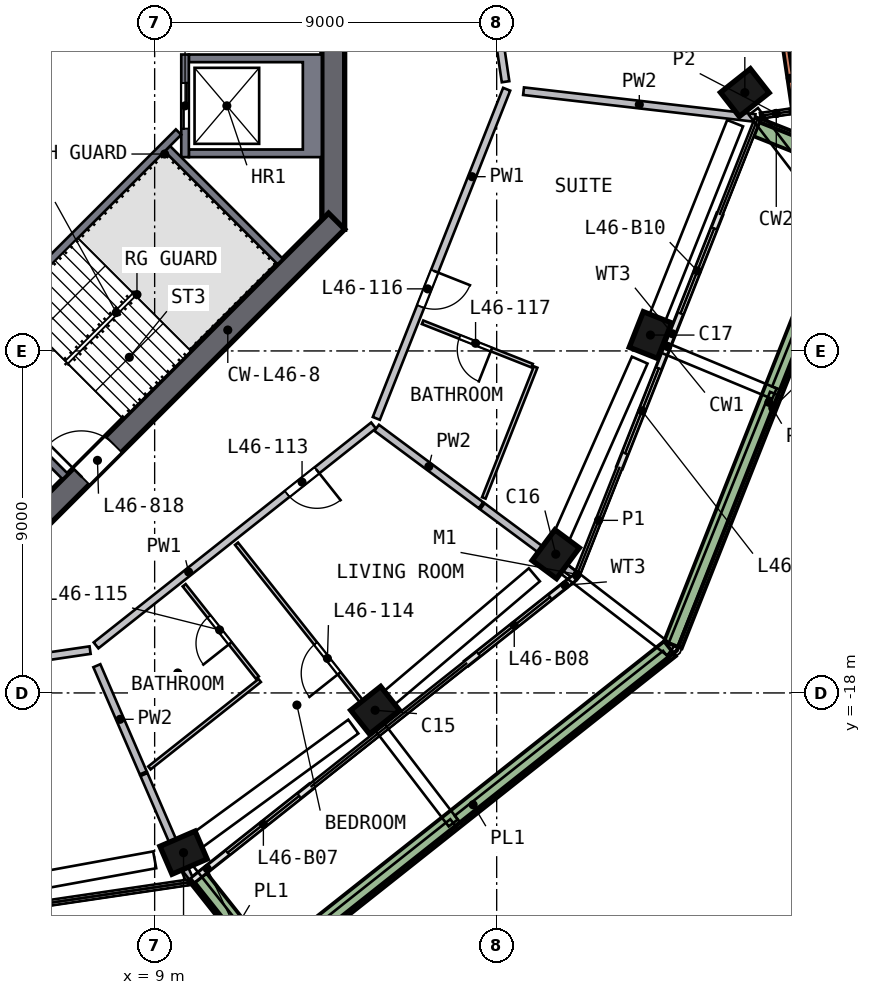
"""IFC4 building model, lengths in metres.
Left out: names, types, materials, properties, quantities, classifications, styles, units other than length and angle.
Written with IfcOpenShell. Run it as: python <this file> out.ifc"""

import sys

from ifc_helpers import new_model, si_unit, direction, frame, frame_2d, origin, origin_2d, place, context, subcontext, project, spatial, polyline, rectangle, outline, extrude, element, fill, save


model = new_model("IFC4")
c1 = context("Model", 3, precision=1e-05, world=origin(), true_north=direction((0.0, 1.0)))
c2 = subcontext(c1, "Body", "Model", "MODEL_VIEW")
j1 = project(units=[si_unit("LENGTHUNIT", "METRE"), si_unit("PLANEANGLEUNIT", "RADIAN")], contexts=[c1])
p1 = place(None, origin())
s1 = spatial("IfcSite", under=j1, at=p1, CompositionType="ELEMENT")
p2 = place(p1, origin())
s2 = spatial("IfcBuilding", under=s1, at=p2, CompositionType="ELEMENT")
p3 = place(p2, frame((0.0, 0.0, 190.5)))
s3 = spatial("IfcBuildingStorey", under=s2, at=p3, CompositionType="ELEMENT", Elevation=190.5)
p4 = place(p3, frame((9.633, -22.26, 0.0), z_axis=(0.105445221, 0.046678706, 0.99332895), x_axis=(-0.911690041, -0.394366098, 0.115311103)))
e1 = element("IfcColumn", 1, at=p4, inside=s3, PredefinedType="COLUMN", context=c2, shape_type="SweptSolid", body=[
    extrude(rectangle(XDim=1.0, YDim=0.8, at=origin_2d()), origin(), (0.0, 0.0, 1.0), 3.211),
])
p5 = place(p3, frame((14.695, -18.541, 0.0), z_axis=(0.087607602, 0.070648839, 0.993646642), x_axis=(0.778743429, 0.617165473, -0.112540881)))
e2 = element("IfcColumn", 2, at=p5, inside=s3, PredefinedType="COLUMN", context=c2, shape_type="SweptSolid", body=[
    extrude(rectangle(XDim=1.0, YDim=0.8, at=origin_2d()), origin(), (0.0, 0.0, 1.0), 3.21),
])
p6 = place(p3, frame((19.472, -14.461, 0.0), z_axis=(0.06796559, 0.093129584, 0.993331545), x_axis=(-0.592364206, -0.797378926, 0.115288748)))
e3 = element("IfcColumn", 3, at=p6, inside=s3, PredefinedType="COLUMN", context=c2, shape_type="SweptSolid", body=[
    extrude(rectangle(XDim=1.0, YDim=0.8, at=origin_2d()), origin(), (0.0, 0.0, 1.0), 3.211),
])
p7 = place(p3, frame((21.997, -8.709, 0.0), z_axis=(0.04053392, 0.104947109, 0.9936514), x_axis=(0.365857575, 0.923846438, -0.112498865)))
e4 = element("IfcColumn", 4, at=p7, inside=s3, PredefinedType="COLUMN", context=c2, shape_type="SweptSolid", body=[
    extrude(rectangle(XDim=1.0, YDim=0.8, at=origin_2d()), origin(), (0.0, 0.0, 1.0), 3.21),
])
p8 = place(p3, frame((24.517, -2.344, 0.0), z_axis=(0.010109138, 0.116597131, 0.993127844), x_axis=(-0.785151985, -0.614102533, 0.080090196)))
e5 = element("IfcColumn", 5, at=p8, inside=s3, PredefinedType="COLUMN", context=c2, shape_type="SweptSolid", body=[
    extrude(rectangle(XDim=1.0, YDim=0.8, at=origin_2d()), origin(), (0.0, 0.0, 1.0), 3.212),
])
p9 = place(p3, frame((13.7, -5.799, 0.0), z_axis=(0.0, 0.0, 1.0), x_axis=(0.0, 1.0, 0.0)))
e6 = element("IfcWall", 6, at=p9, inside=s3, PredefinedType="SHEAR", context=c2, shape_type="SweptSolid", body=[
    extrude(rectangle(XDim=11.598, YDim=0.6, at=frame_2d((5.799, 0.0))), origin(), (0.0, 0.0, 1.0), 3.5),
])
p10 = place(p9, frame((4.899, 0.0, 0.0)))
e7 = element("IfcOpeningElement", 7, at=p10, cuts=e6, PredefinedType="OPENING", context=c2, shape_type="SweptSolid", body=[
    extrude(rectangle(XDim=1.8, YDim=2.1, at=frame_2d((0.9, 1.05))), frame((0.0, 0.31, 0.0), z_axis=(0.0, -1.0, 0.0), x_axis=(1.0, 0.0, 0.0)), (0.0, 0.0, 1.0), 0.62),
])
p11 = place(p3, frame((5.587, -13.788, 0.0), z_axis=(0.0, 0.0, 1.0), x_axis=(0.707106781, 0.707106781, 0.0)))
e8 = element("IfcWall", 8, at=p11, inside=s3, PredefinedType="SHEAR", context=c2, shape_type="SweptSolid", body=[
    extrude(rectangle(XDim=11.598, YDim=0.6, at=frame_2d((5.799, 0.0))), origin(), (0.0, 0.0, 1.0), 3.5),
])
p12 = place(p11, frame((2.099, 0.0, 0.0)))
e9 = element("IfcOpeningElement", 9, at=p12, cuts=e8, PredefinedType="OPENING", context=c2, shape_type="SweptSolid", body=[
    extrude(rectangle(XDim=1.2, YDim=2.1, at=frame_2d((0.6, 1.05))), frame((0.0, 0.31, 0.0), z_axis=(0.0, -1.0, 0.0), x_axis=(1.0, 0.0, 0.0)), (0.0, 0.0, 1.0), 0.62),
])
p13 = place(p3, frame((25.863, -2.751, 0.0), z_axis=(0.0, 0.0, 1.0), x_axis=(-0.146086211, 0.989271863, 0.0)))
e10 = element("IfcWall", 10, at=p13, inside=s3, PredefinedType="SOLIDWALL", context=c2, shape_type="SweptSolid", body=[
    extrude(rectangle(XDim=1.875, YDim=0.15, at=frame_2d((0.938, 0.0))), origin(), (0.0, 0.0, 1.0), 3.19),
])
p14 = place(p3, frame((10.006, -22.927, 0.0), z_axis=(0.0, 0.0, 1.0), x_axis=(0.783712528, 0.621123718, 0.0)))
e11 = element("IfcWall", 11, at=p14, inside=s3, PredefinedType="SOLIDWALL", context=c2, shape_type="SweptSolid", body=[
    extrude(rectangle(XDim=3.967, YDim=0.15, at=frame_2d((1.984, 0.0))), origin(), (0.0, 0.0, 1.0), 2.475),
])
p15 = place(p14, frame((1.167, 0.0, 0.0)))
e12 = element("IfcOpeningElement", 12, at=p15, cuts=e11, PredefinedType="OPENING", context=c2, shape_type="SweptSolid", body=[
    extrude(rectangle(XDim=2.4, YDim=2.4, at=frame_2d((1.2, 1.2))), frame((0.0, 0.085, 0.0), z_axis=(0.0, -1.0, 0.0), x_axis=(1.0, 0.0, 0.0)), (0.0, 0.0, 1.0), 0.17),
])
p16 = place(p3, frame((17.209, -17.219, 0.0), z_axis=(0.0, 0.0, 1.0), x_axis=(0.783705487, 0.621132603, 0.0)))
e13 = element("IfcWall", 13, at=p16, inside=s3, PredefinedType="SOLIDWALL", context=c2, shape_type="SweptSolid", body=[
    extrude(rectangle(XDim=3.609, YDim=0.15, at=frame_2d((1.804, 0.0))), origin(), (0.0, 0.0, 1.0), 2.475),
])
p17 = place(p16, frame((0.4, 0.0, 0.0)))
e14 = element("IfcOpeningElement", 14, at=p17, cuts=e13, PredefinedType="OPENING", context=c2, shape_type="SweptSolid", body=[
    extrude(rectangle(XDim=2.4, YDim=2.4, at=frame_2d((1.2, 1.2))), frame((0.0, 0.085, 0.0), z_axis=(0.0, -1.0, 0.0), x_axis=(1.0, 0.0, 0.0)), (0.0, 0.0, 1.0), 0.17),
])
p18 = place(p3, frame((21.233, -12.064, 0.0), z_axis=(0.0, 0.0, 1.0), x_axis=(0.368157089, 0.929763603, 0.0)))
e15 = element("IfcWall", 15, at=p18, inside=s3, PredefinedType="SOLIDWALL", context=c2, shape_type="SweptSolid", body=[
    extrude(rectangle(XDim=3.4, YDim=0.15, at=frame_2d((1.7, 0.0))), origin(), (0.0, 0.0, 1.0), 2.475),
])
p19 = place(p18, frame((0.4, 0.0, 0.0)))
e16 = element("IfcOpeningElement", 16, at=p19, cuts=e15, PredefinedType="OPENING", context=c2, shape_type="SweptSolid", body=[
    extrude(rectangle(XDim=2.4, YDim=2.4, at=frame_2d((1.2, 1.2))), frame((0.0, 0.085, 0.0), z_axis=(0.0, -1.0, 0.0), x_axis=(1.0, 0.0, 0.0)), (0.0, 0.0, 1.0), 0.17),
])
p20 = place(p3, frame((22.485, -8.903, 0.0), z_axis=(0.0, 0.0, 1.0), x_axis=(0.36808703, 0.929791341, 0.0)))
e17 = element("IfcWall", 17, at=p20, inside=s3, PredefinedType="SOLIDWALL", context=c2, shape_type="SweptSolid", body=[
    extrude(rectangle(XDim=3.761, YDim=0.15, at=frame_2d((1.881, 0.0))), origin(), (0.0, 0.0, 1.0), 2.475),
])
p21 = place(p20, frame((0.961, 0.0, 0.0)))
e18 = element("IfcOpeningElement", 18, at=p21, cuts=e17, PredefinedType="OPENING", context=c2, shape_type="SweptSolid", body=[
    extrude(rectangle(XDim=2.4, YDim=2.4, at=frame_2d((1.2, 1.2))), frame((0.0, 0.085, 0.0), z_axis=(0.0, -1.0, 0.0), x_axis=(1.0, 0.0, 0.0)), (0.0, 0.0, 1.0), 0.17),
])
p22 = place(p3, frame((10.171, -22.894, 0.0), z_axis=(0.0, 0.0, 1.0), x_axis=(0.621142666, -0.783697511, 0.0)))
e19 = element("IfcWall", 19, at=p22, inside=s3, PredefinedType="SOLIDWALL", context=c2, shape_type="SweptSolid", body=[
    extrude(rectangle(XDim=3.199, YDim=0.5, at=frame_2d((1.6, 0.0))), origin(), (0.0, 0.0, 1.0), 0.7),
])
p23 = place(p3, frame((12.198, -25.05, 0.0), z_axis=(0.0, 0.0, 1.0), x_axis=(0.783694155, 0.6211469, 0.0)))
e20 = element("IfcWall", 20, at=p23, inside=s3, PredefinedType="SOLIDWALL", context=c2, shape_type="SweptSolid", body=[
    extrude(rectangle(XDim=13.223, YDim=0.5, at=frame_2d((6.612, 0.0))), origin(), (0.0, 0.0, 1.0), 0.7),
])
p24 = place(p3, frame((22.638, -16.732, 0.0), z_axis=(0.0, 0.0, 1.0), x_axis=(0.368127914, 0.929775155, 0.0)))
e21 = element("IfcWall", 21, at=p24, inside=s3, PredefinedType="SOLIDWALL", context=c2, shape_type="SweptSolid", body=[
    extrude(rectangle(XDim=13.723, YDim=0.5, at=frame_2d((6.862, 0.0))), origin(), (0.0, 0.0, 1.0), 0.7),
])
p25 = place(p3, frame((27.366, -4.113, 0.0), z_axis=(0.0, 0.0, 1.0), x_axis=(-0.92976856, 0.36814457, 0.0)))
e22 = element("IfcWall", 22, at=p25, inside=s3, PredefinedType="SOLIDWALL", context=c2, shape_type="SweptSolid", body=[
    extrude(rectangle(XDim=2.699, YDim=0.5, at=frame_2d((1.35, 0.0))), origin(), (0.0, 0.0, 1.0), 0.7),
])
p26 = place(p3, origin())
e23 = element("IfcWall", 23, at=p26, inside=s3, PredefinedType="SOLIDWALL", context=c2, shape_type="SweptSolid", body=[
    extrude(outline(polyline([(13.4, -3.9), (9.9, -3.9), (9.9, -3.7), (12.9, -3.7), (12.9, -1.4), (9.9, -1.4), (9.9, -1.2), (13.4, -1.2), (13.4, -3.9)])), origin(), (0.0, 0.0, 1.0), 3.19),
])
p27 = place(p3, frame((9.8, -1.2, 0.0), z_axis=(0.0, 0.0, 1.0), x_axis=(0.0, -1.0, 0.0)))
e24 = element("IfcWall", 24, at=p27, inside=s3, PredefinedType="SOLIDWALL", context=c2, shape_type="SweptSolid", body=[
    extrude(rectangle(XDim=2.7, YDim=0.2, at=frame_2d((1.35, 0.0))), origin(), (0.0, 0.0, 1.0), 3.19),
])
p28 = place(p27, frame((0.75, 0.0, 0.0)))
e25 = element("IfcOpeningElement", 25, at=p28, cuts=e24, PredefinedType="OPENING", context=c2, shape_type="SweptSolid", body=[
    extrude(rectangle(XDim=1.2, YDim=2.1, at=frame_2d((0.6, 1.05))), frame((0.0, 0.11, 0.0), z_axis=(0.0, -1.0, 0.0), x_axis=(1.0, 0.0, 0.0)), (0.0, 0.0, 1.0), 0.22),
])
p29 = place(p3, frame((9.629, -3.24, 0.0), z_axis=(0.0, 0.0, 1.0), x_axis=(-0.707120946, -0.707092617, 0.0)))
e26 = element("IfcWall", 26, at=p29, inside=s3, PredefinedType="SOLIDWALL", context=c2, shape_type="SweptSolid", body=[
    extrude(rectangle(XDim=8.618, YDim=0.2, at=frame_2d((4.309, 0.0))), origin(), (0.0, 0.0, 1.0), 3.19),
])
p30 = place(p29, frame((7.018, 0.0, 0.0)))
e27 = element("IfcOpeningElement", 27, at=p30, cuts=e26, PredefinedType="OPENING", context=c2, shape_type="SweptSolid", body=[
    extrude(rectangle(XDim=1.2, YDim=2.1, at=frame_2d((0.6, 1.05))), frame((0.0, 0.11, 0.0), z_axis=(0.0, -1.0, 0.0), x_axis=(1.0, 0.0, 0.0)), (0.0, 0.0, 1.0), 0.22),
])
for number, where, z_axis, x_axis in (
    (28, (3.677, -9.334, 0.0), (0.0, 0.0, 1.0), (0.707, -0.707, 0.0)),
    (29, (9.334, -3.677, 0.0), (0.0, 0.0, 1.0), (0.707, -0.707, 0.0)),
):
    element("IfcWall", number, at=place(p3, frame(where, z_axis=z_axis, x_axis=x_axis)), inside=s3, PredefinedType="SOLIDWALL", context=c2, shape_type="SweptSolid", body=[
        extrude(rectangle(XDim=4.2, YDim=0.2, at=frame_2d((2.1, 0.0))), origin(), (0.0, 0.0, 1.0), 3.19),
    ])
p31 = place(p3, frame((7.302, -16.873, 0.0), z_axis=(0.0, 0.0, 1.0), x_axis=(-0.989275099, -0.146064299, 0.0)))
e30 = element("IfcWall", 30, at=p31, inside=s3, PredefinedType="SOLIDWALL", context=c2, shape_type="SweptSolid", body=[
    extrude(rectangle(XDim=9.317, YDim=0.2, at=frame_2d((4.658, 0.0))), origin(), (0.0, 0.0, 1.0), 3.19),
])
p32 = place(p31, frame((5.15, 0.0, 0.0)))
e31 = element("IfcOpeningElement", 31, at=p32, cuts=e30, PredefinedType="OPENING", context=c2, shape_type="SweptSolid", body=[
    extrude(rectangle(XDim=1.0, YDim=2.1, at=frame_2d((0.5, 1.05))), frame((0.0, 0.11, 0.0), z_axis=(0.0, -1.0, 0.0), x_axis=(1.0, 0.0, 0.0)), (0.0, 0.0, 1.0), 0.22),
])
p33 = place(p3, frame((14.76, -10.961, 0.0), z_axis=(0.0, 0.0, 1.0), x_axis=(-0.783683297, -0.621160599, 0.0)))
e32 = element("IfcWall", 32, at=p33, inside=s3, PredefinedType="SOLIDWALL", context=c2, shape_type="SweptSolid", body=[
    extrude(rectangle(XDim=9.317, YDim=0.2, at=frame_2d((4.658, 0.0))), origin(), (0.0, 0.0, 1.0), 3.19),
])
p34 = place(p33, frame((1.9, 0.0, 0.0)))
e33 = element("IfcOpeningElement", 33, at=p34, cuts=e32, PredefinedType="OPENING", context=c2, shape_type="SweptSolid", body=[
    extrude(rectangle(XDim=1.0, YDim=2.1, at=frame_2d((0.5, 1.05))), frame((0.0, 0.11, 0.0), z_axis=(0.0, -1.0, 0.0), x_axis=(1.0, 0.0, 0.0)), (0.0, 0.0, 1.0), 0.22),
])
p35 = place(p3, frame((18.263, -2.113, 0.0), z_axis=(0.0, 0.0, 1.0), x_axis=(-0.368126327, -0.929775783, 0.0)))
e34 = element("IfcWall", 34, at=p35, inside=s3, PredefinedType="SOLIDWALL", context=c2, shape_type="SweptSolid", body=[
    extrude(rectangle(XDim=9.317, YDim=0.2, at=frame_2d((4.658, 0.0))), origin(), (0.0, 0.0, 1.0), 3.19),
])
p36 = place(p35, frame((5.15, 0.0, 0.0)))
e35 = element("IfcOpeningElement", 35, at=p36, cuts=e34, PredefinedType="OPENING", context=c2, shape_type="SweptSolid", body=[
    extrude(rectangle(XDim=1.0, YDim=2.1, at=frame_2d((0.5, 1.05))), frame((0.0, 0.11, 0.0), z_axis=(0.0, -1.0, 0.0), x_axis=(1.0, 0.0, 0.0)), (0.0, 0.0, 1.0), 0.22),
])
p37 = place(p3, frame((16.873, 7.302, 0.0), z_axis=(0.0, 0.0, 1.0), x_axis=(0.146064299, -0.989275099, 0.0)))
e36 = element("IfcWall", 36, at=p37, inside=s3, PredefinedType="SOLIDWALL", context=c2, shape_type="SweptSolid", body=[
    extrude(rectangle(XDim=9.317, YDim=0.2, at=frame_2d((4.658, 0.0))), origin(), (0.0, 0.0, 1.0), 3.19),
])
p38 = place(p37, frame((3.869, 0.0, 0.0)))
e37 = element("IfcOpeningElement", 37, at=p38, cuts=e36, PredefinedType="OPENING", context=c2, shape_type="SweptSolid", body=[
    extrude(rectangle(XDim=1.8, YDim=2.1, at=frame_2d((0.9, 1.05))), frame((0.0, 0.11, 0.0), z_axis=(0.0, -1.0, 0.0), x_axis=(1.0, 0.0, 0.0)), (0.0, 0.0, 1.0), 0.22),
])
p39 = place(p3, frame((7.479, -17.283, 0.0), z_axis=(0.0, 0.0, 1.0), x_axis=(0.397175095, -0.917742853, 0.0)))
e38 = element("IfcWall", 38, at=p39, inside=s3, PredefinedType="SOLIDWALL", context=c2, shape_type="SweptSolid", body=[
    extrude(rectangle(XDim=3.075, YDim=0.2, at=frame_2d((1.537, 0.0))), origin(), (0.0, 0.0, 1.0), 3.19),
])
p40 = place(p3, frame((8.719, -20.147, 0.0), z_axis=(0.0, 0.0, 1.0), x_axis=(0.39710682, -0.917772397, 0.0)))
e39 = element("IfcWall", 39, at=p40, inside=s3, PredefinedType="SOLIDWALL", context=c2, shape_type="SweptSolid", body=[
    extrude(rectangle(XDim=3.011, YDim=0.2, at=frame_2d((1.506, 0.0))), origin(), (0.0, 0.0, 1.0), 3.19),
])
p41 = place(p3, frame((14.843, -11.023, 0.0), z_axis=(0.0, 0.0, 1.0), x_axis=(0.802827845, -0.596210911, 0.0)))
e40 = element("IfcWall", 40, at=p41, inside=s3, PredefinedType="SOLIDWALL", context=c2, shape_type="SweptSolid", body=[
    extrude(rectangle(XDim=3.418, YDim=0.2, at=frame_2d((1.709, 0.0))), origin(), (0.0, 0.0, 1.0), 3.19),
])
p42 = place(p3, frame((17.624, -13.089, 0.0), z_axis=(0.0, 0.0, 1.0), x_axis=(0.802773785, -0.596283699, 0.0)))
e41 = element("IfcWall", 41, at=p42, inside=s3, PredefinedType="SOLIDWALL", context=c2, shape_type="SweptSolid", body=[
    extrude(rectangle(XDim=3.011, YDim=0.2, at=frame_2d((1.506, 0.0))), origin(), (0.0, 0.0, 1.0), 3.19),
])
p43 = place(p3, frame((24.799, -2.869, 0.0), z_axis=(0.0, 0.0, 1.0), x_axis=(-0.993371918, 0.114944478, 0.0)))
e42 = element("IfcWall", 42, at=p43, inside=s3, PredefinedType="SOLIDWALL", context=c2, shape_type="SweptSolid", body=[
    extrude(rectangle(XDim=6.132, YDim=0.2, at=frame_2d((3.066, 0.0))), origin(), (0.0, 0.0, 1.0), 3.19),
])
p44 = place(p3, frame((8.862, -19.975, 0.0), z_axis=(0.0, 0.0, 1.0), x_axis=(0.783664748, 0.621184001, 0.0)))
e43 = element("IfcWall", 43, at=p44, inside=s3, PredefinedType="PARTITIONING", context=c2, shape_type="SweptSolid", body=[
    extrude(rectangle(XDim=3.704, YDim=0.1, at=frame_2d((1.852, 0.0))), origin(), (0.0, 0.0, 1.0), 3.19),
])
p45 = place(p3, frame((11.702, -17.595, 0.0), z_axis=(0.0, 0.0, 1.0), x_axis=(-0.621144616, 0.783695965, 0.0)))
e44 = element("IfcWall", 44, at=p45, inside=s3, PredefinedType="PARTITIONING", context=c2, shape_type="SweptSolid", body=[
    extrude(rectangle(XDim=3.1, YDim=0.1, at=frame_2d((1.55, 0.0))), origin(), (0.0, 0.0, 1.0), 3.19),
])
p46 = place(p45, frame((1.15, 0.0, 0.0)))
e45 = element("IfcOpeningElement", 45, at=p46, cuts=e44, PredefinedType="OPENING", context=c2, shape_type="SweptSolid", body=[
    extrude(rectangle(XDim=0.9, YDim=2.1, at=frame_2d((0.45, 1.05))), frame((0.0, 0.06, 0.0), z_axis=(0.0, -1.0, 0.0), x_axis=(1.0, 0.0, 0.0)), (0.0, 0.0, 1.0), 0.12),
])
p47 = place(p3, frame((14.975, -18.894, 0.0), z_axis=(0.0, 0.0, 1.0), x_axis=(-0.621140066, 0.783699571, 0.0)))
e46 = element("IfcWall", 46, at=p47, inside=s3, PredefinedType="PARTITIONING", context=c2, shape_type="SweptSolid", body=[
    extrude(rectangle(XDim=6.15, YDim=0.1, at=frame_2d((3.075, 0.0))), origin(), (0.0, 0.0, 1.0), 3.19),
])
p48 = place(p47, frame((1.8, 0.0, 0.0)))
e47 = element("IfcOpeningElement", 47, at=p48, cuts=e46, PredefinedType="OPENING", context=c2, shape_type="SweptSolid", body=[
    extrude(rectangle(XDim=1.0, YDim=2.1, at=frame_2d((0.5, 1.05))), frame((0.0, 0.06, 0.0), z_axis=(0.0, -1.0, 0.0), x_axis=(1.0, 0.0, 0.0)), (0.0, 0.0, 1.0), 0.12),
])
p49 = place(p3, frame((18.932, -9.387, 0.0), z_axis=(0.0, 0.0, 1.0), x_axis=(-0.929795945, 0.3680754, 0.0)))
e48 = element("IfcWall", 48, at=p49, inside=s3, PredefinedType="PARTITIONING", context=c2, shape_type="SweptSolid", body=[
    extrude(rectangle(XDim=3.1, YDim=0.1, at=frame_2d((1.55, 0.0))), origin(), (0.0, 0.0, 1.0), 3.19),
])
p50 = place(p49, frame((1.15, 0.0, 0.0)))
e49 = element("IfcOpeningElement", 49, at=p50, cuts=e48, PredefinedType="OPENING", context=c2, shape_type="SweptSolid", body=[
    extrude(rectangle(XDim=0.9, YDim=2.1, at=frame_2d((0.45, 1.05))), frame((0.0, 0.06, 0.0), z_axis=(0.0, -1.0, 0.0), x_axis=(1.0, 0.0, 0.0)), (0.0, 0.0, 1.0), 0.12),
])
p51 = place(p3, frame((19.025, -9.424, 0.0), z_axis=(0.0, 0.0, 1.0), x_axis=(-0.368126804, -0.929775595, 0.0)))
e50 = element("IfcWall", 50, at=p51, inside=s3, PredefinedType="PARTITIONING", context=c2, shape_type="SweptSolid", body=[
    extrude(rectangle(XDim=3.704, YDim=0.1, at=frame_2d((1.852, 0.0))), origin(), (0.0, 0.0, 1.0), 3.19),
])
p52 = place(p15, origin())
e51 = element("IfcDoor", 51, at=p52, inside=s3, OperationType="SLIDING_TO_LEFT", PredefinedType="DOOR", context=c2, shape_type="SweptSolid", body=[
    extrude(rectangle(XDim=2.4, YDim=2.4, at=frame_2d((1.2, 1.2))), frame((0.0, 0.025, 0.0), z_axis=(0.0, -1.0, 0.0), x_axis=(1.0, 0.0, 0.0)), (0.0, 0.0, 1.0), 0.05),
])
fill(e12, e51)
p53 = place(p17, origin())
e52 = element("IfcDoor", 52, at=p53, inside=s3, OperationType="SLIDING_TO_RIGHT", PredefinedType="DOOR", context=c2, shape_type="SweptSolid", body=[
    extrude(rectangle(XDim=2.4, YDim=2.4, at=frame_2d((1.2, 1.2))), frame((0.0, 0.025, 0.0), z_axis=(0.0, -1.0, 0.0), x_axis=(1.0, 0.0, 0.0)), (0.0, 0.0, 1.0), 0.05),
])
fill(e14, e52)
p54 = place(p19, origin())
e53 = element("IfcDoor", 53, at=p54, inside=s3, OperationType="SLIDING_TO_RIGHT", PredefinedType="DOOR", context=c2, shape_type="SweptSolid", body=[
    extrude(rectangle(XDim=2.4, YDim=2.4, at=frame_2d((1.2, 1.2))), frame((0.0, 0.025, 0.0), z_axis=(0.0, -1.0, 0.0), x_axis=(1.0, 0.0, 0.0)), (0.0, 0.0, 1.0), 0.05),
])
fill(e16, e53)
p55 = place(p21, origin())
e54 = element("IfcDoor", 54, at=p55, inside=s3, OperationType="SLIDING_TO_LEFT", PredefinedType="DOOR", context=c2, shape_type="SweptSolid", body=[
    extrude(rectangle(XDim=2.4, YDim=2.4, at=frame_2d((1.2, 1.2))), frame((0.0, 0.025, 0.0), z_axis=(0.0, -1.0, 0.0), x_axis=(1.0, 0.0, 0.0)), (0.0, 0.0, 1.0), 0.05),
])
fill(e18, e54)
p56 = place(p28, origin())
e55 = element("IfcDoor", 55, at=p56, inside=s3, OperationType="DOUBLE_DOOR_SLIDING", PredefinedType="DOOR", context=c2, shape_type="SweptSolid", body=[
    extrude(rectangle(XDim=1.2, YDim=2.1, at=frame_2d((0.6, 1.05))), frame((0.0, 0.025, 0.0), z_axis=(0.0, -1.0, 0.0), x_axis=(1.0, 0.0, 0.0)), (0.0, 0.0, 1.0), 0.05),
])
fill(e25, e55)
p57 = place(p12, origin())
e56 = element("IfcDoor", 56, at=p57, inside=s3, OperationType="SINGLE_SWING_LEFT", PredefinedType="DOOR", context=c2, shape_type="SweptSolid", body=[
    extrude(rectangle(XDim=1.2, YDim=2.1, at=frame_2d((0.6, 1.05))), frame((0.0, 0.025, 0.0), z_axis=(0.0, -1.0, 0.0), x_axis=(1.0, 0.0, 0.0)), (0.0, 0.0, 1.0), 0.05),
])
fill(e9, e56)
p58 = place(p34, origin())
e57 = element("IfcDoor", 57, at=p58, inside=s3, OperationType="SINGLE_SWING_LEFT", PredefinedType="DOOR", context=c2, shape_type="SweptSolid", body=[
    extrude(rectangle(XDim=1.0, YDim=2.1, at=frame_2d((0.5, 1.05))), frame((0.0, 0.025, 0.0), z_axis=(0.0, -1.0, 0.0), x_axis=(1.0, 0.0, 0.0)), (0.0, 0.0, 1.0), 0.05),
])
fill(e33, e57)
p59 = place(p48, origin())
e58 = element("IfcDoor", 58, at=p59, inside=s3, OperationType="SINGLE_SWING_LEFT", PredefinedType="DOOR", context=c2, shape_type="SweptSolid", body=[
    extrude(rectangle(XDim=1.0, YDim=2.1, at=frame_2d((0.5, 1.05))), frame((0.0, 0.025, 0.0), z_axis=(0.0, -1.0, 0.0), x_axis=(1.0, 0.0, 0.0)), (0.0, 0.0, 1.0), 0.05),
])
fill(e47, e58)
p60 = place(p46, origin())
e59 = element("IfcDoor", 59, at=p60, inside=s3, OperationType="SINGLE_SWING_LEFT", PredefinedType="DOOR", context=c2, shape_type="SweptSolid", body=[
    extrude(rectangle(XDim=0.9, YDim=2.1, at=frame_2d((0.45, 1.05))), frame((0.0, 0.025, 0.0), z_axis=(0.0, -1.0, 0.0), x_axis=(1.0, 0.0, 0.0)), (0.0, 0.0, 1.0), 0.05),
])
fill(e45, e59)
p61 = place(p36, origin())
e60 = element("IfcDoor", 60, at=p61, inside=s3, OperationType="SINGLE_SWING_LEFT", PredefinedType="DOOR", context=c2, shape_type="SweptSolid", body=[
    extrude(rectangle(XDim=1.0, YDim=2.1, at=frame_2d((0.5, 1.05))), frame((0.0, 0.025, 0.0), z_axis=(0.0, -1.0, 0.0), x_axis=(1.0, 0.0, 0.0)), (0.0, 0.0, 1.0), 0.05),
])
fill(e35, e60)
p62 = place(p50, origin())
e61 = element("IfcDoor", 61, at=p62, inside=s3, OperationType="SINGLE_SWING_LEFT", PredefinedType="DOOR", context=c2, shape_type="SweptSolid", body=[
    extrude(rectangle(XDim=0.9, YDim=2.1, at=frame_2d((0.45, 1.05))), frame((0.0, 0.025, 0.0), z_axis=(0.0, -1.0, 0.0), x_axis=(1.0, 0.0, 0.0)), (0.0, 0.0, 1.0), 0.05),
])
fill(e49, e61)
save(model, sys.argv[1])
